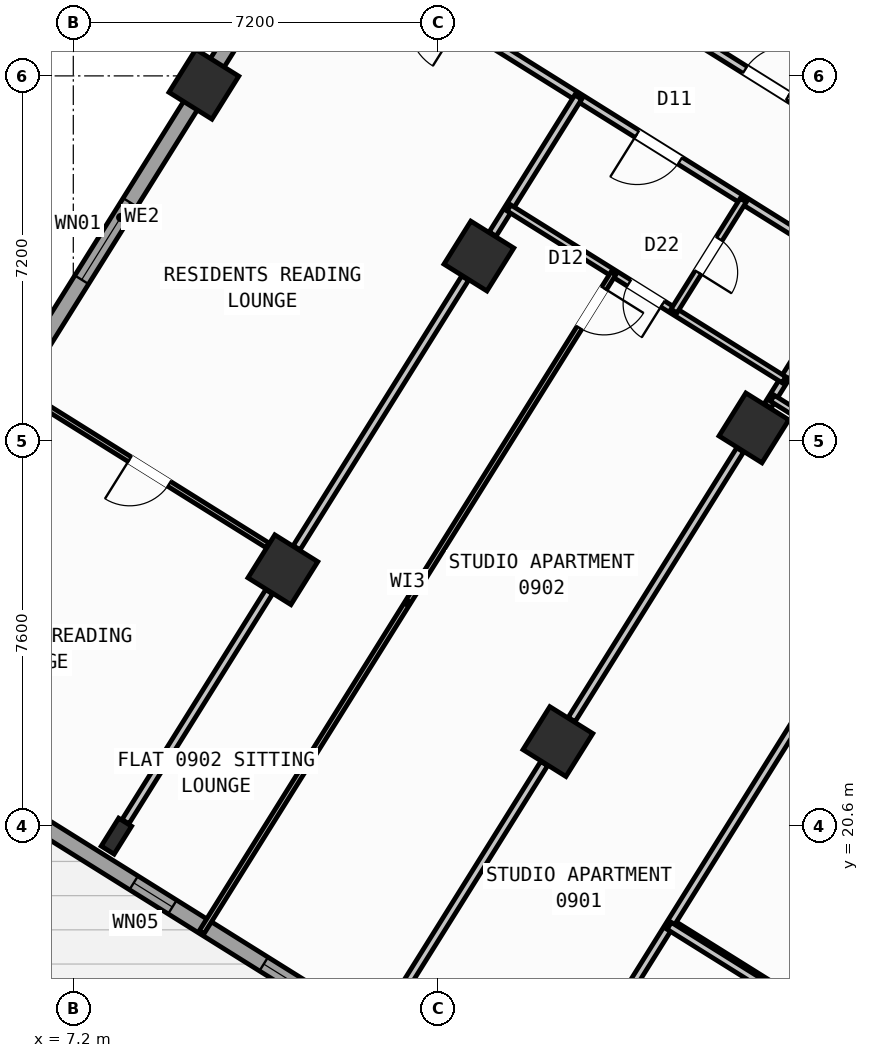
"""IFC4 building model, lengths in metres.
Left out: names, types, materials, properties, quantities, classifications, styles, units other than length and angle.
Written with IfcOpenShell. Run it as: python <this file> out.ifc"""

import sys

from ifc_helpers import new_model, si_unit, direction, frame, frame_2d, origin, origin_2d, place, context, subcontext, project, spatial, rectangle, hollow_rectangle, i_section, extrude, source, transform, mapped, element, fill, save


model = new_model("IFC4")
c1 = context("Model", 3, precision=1e-05, world=origin(), true_north=direction((0.0, 1.0)))
c2 = subcontext(c1, "Body", "Model", "MODEL_VIEW")
j1 = project(units=[si_unit("LENGTHUNIT", "METRE"), si_unit("PLANEANGLEUNIT", "RADIAN")], contexts=[c1])
p1 = place(None, origin())
s1 = spatial("IfcSite", under=j1, at=p1, CompositionType="ELEMENT")
p2 = place(p1, origin())
s2 = spatial("IfcBuilding", under=s1, at=p2, CompositionType="ELEMENT")
p3 = place(p2, frame((0.0, 0.0, 38.4)))
s3 = spatial("IfcBuildingStorey", under=s2, at=p3, CompositionType="ELEMENT", Elevation=38.4)
m1 = source(origin(), c2, "Body", "SweptSolid", [
    extrude(hollow_rectangle(XDim=1.0, YDim=1.0, WallThickness=0.04, at=origin_2d()), origin(), (0.0, 0.0, 1.0), 3.6),
])
for number, where, z_axis, x_axis in (
    (1, (20.632, 28.452, 0.0), (0.0, 0.0, 1.0), (-0.848, 0.53, 0.0)),
    (2, (16.764, 22.261, 0.0), (0.0, 0.0, 1.0), (-0.848, 0.53, 0.0)),
    (3, (15.205, 31.844, 0.0), (0.0, 0.0, 1.0), (-0.848, 0.53, 0.0)),
    (4, (11.336, 25.653, 0.0), (0.0, 0.0, 1.0), (-0.848, 0.53, 0.0)),
):
    element("IfcColumn", number, at=place(p3, frame(where, z_axis=z_axis, x_axis=x_axis)), inside=s3, PredefinedType="COLUMN", context=c2, shape_type="MappedRepresentation", body=[
        mapped(m1, transform((0.0, 0.0, 0.0), scale=1.0)),
    ])
m2 = source(origin(), c2, "Body", "SweptSolid", [
    extrude(i_section(OverallWidth=0.3, OverallDepth=0.65, WebThickness=0.016, FlangeThickness=0.031, at=origin_2d()), origin(), (0.0, 0.0, 1.0), 3.6),
])
p4 = place(p3, frame((8.051, 20.395, 0.0), z_axis=(0.0, 0.0, 1.0), x_axis=(-0.848048096156, 0.529919264233, 0.0)))
e5 = element("IfcColumn", 5, at=p4, inside=s3, PredefinedType="COLUMN", context=c2, shape_type="MappedRepresentation", body=[
    mapped(m2, transform((0.0, 0.0, 0.0), scale=1.0)),
])
p5 = place(p3, frame((9.777, 35.235, 0.0), z_axis=(0.0, 0.0, 1.0), x_axis=(-0.848048096156, 0.529919264233, 0.0)))
e6 = element("IfcColumn", 6, at=p5, inside=s3, PredefinedType="COLUMN", context=c2, shape_type="MappedRepresentation", body=[
    mapped(m1, transform((0.0, 0.0, 0.0), scale=1.0)),
])
p6 = place(p3, frame((29.268, 6.429, 0.0), z_axis=(0.0, 0.0, 1.0), x_axis=(-0.848049971435, 0.529916263149, 0.0)))
e7 = element("IfcWall", 7, at=p6, inside=s3, PredefinedType="STANDARD", context=c2, shape_type="SweptSolid", body=[
    extrude(rectangle(XDim=31.588, YDim=0.32, at=frame_2d((15.794, 0.0))), origin(), (0.0, 0.0, 1.0), 3.35),
])
p7 = place(p6, frame((16.362, 0.0, 0.0)))
e8 = element("IfcOpeningElement", 8, at=p7, cuts=e7, PredefinedType="OPENING", context=c2, shape_type="SweptSolid", body=[
    extrude(rectangle(XDim=1.2, YDim=2.15, at=frame_2d((0.6, 1.075))), frame((0.0, 0.17, 0.0), z_axis=(0.0, -1.0, 0.0), x_axis=(1.0, 0.0, 0.0)), (0.0, 0.0, 1.0), 0.34),
])
p8 = place(p6, frame((2.989, 0.0, 0.8)))
e9 = element("IfcOpeningElement", 9, at=p8, cuts=e7, PredefinedType="OPENING", context=c2, shape_type="SweptSolid", body=[
    extrude(rectangle(XDim=2.1, YDim=1.55, at=frame_2d((1.05, 0.775))), frame((0.0, 0.17, 0.0), z_axis=(0.0, -1.0, 0.0), x_axis=(1.0, 0.0, 0.0)), (0.0, 0.0, 1.0), 0.34),
])
p9 = place(p6, frame((8.359, 0.0, 0.8)))
e10 = element("IfcOpeningElement", 10, at=p9, cuts=e7, PredefinedType="OPENING", context=c2, shape_type="SweptSolid", body=[
    extrude(rectangle(XDim=2.1, YDim=1.55, at=frame_2d((1.05, 0.775))), frame((0.0, 0.17, 0.0), z_axis=(0.0, -1.0, 0.0), x_axis=(1.0, 0.0, 0.0)), (0.0, 0.0, 1.0), 0.34),
])
p10 = place(p6, frame((13.284, 0.0, 0.95)))
e11 = element("IfcOpeningElement", 11, at=p10, cuts=e7, PredefinedType="OPENING", context=c2, shape_type="SweptSolid", body=[
    extrude(rectangle(XDim=1.2, YDim=1.4, at=frame_2d((0.6, 0.7))), frame((0.0, 0.17, 0.0), z_axis=(0.0, -1.0, 0.0), x_axis=(1.0, 0.0, 0.0)), (0.0, 0.0, 1.0), 0.34),
])
p11 = place(p6, frame((20.39, 0.0, 0.95)))
e12 = element("IfcOpeningElement", 12, at=p11, cuts=e7, PredefinedType="OPENING", context=c2, shape_type="SweptSolid", body=[
    extrude(rectangle(XDim=1.2, YDim=1.4, at=frame_2d((0.6, 0.7))), frame((0.0, 0.17, 0.0), z_axis=(0.0, -1.0, 0.0), x_axis=(1.0, 0.0, 0.0)), (0.0, 0.0, 1.0), 0.34),
])
p12 = place(p6, frame((23.715, 0.0, 1.0)))
e13 = element("IfcOpeningElement", 13, at=p12, cuts=e7, PredefinedType="OPENING", context=c2, shape_type="SweptSolid", body=[
    extrude(rectangle(XDim=0.9, YDim=1.25, at=frame_2d((0.45, 0.625))), frame((0.0, 0.17, 0.0), z_axis=(0.0, -1.0, 0.0), x_axis=(1.0, 0.0, 0.0)), (0.0, 0.0, 1.0), 0.34),
])
p13 = place(p6, frame((27.481, 0.0, 0.8)))
e14 = element("IfcOpeningElement", 14, at=p13, cuts=e7, PredefinedType="OPENING", context=c2, shape_type="SweptSolid", body=[
    extrude(rectangle(XDim=2.1, YDim=1.55, at=frame_2d((1.05, 0.775))), frame((0.0, 0.17, 0.0), z_axis=(0.0, -1.0, 0.0), x_axis=(1.0, 0.0, 0.0)), (0.0, 0.0, 1.0), 0.34),
])
p14 = place(p3, frame((2.415, 23.452, 0.0), z_axis=(0.0, 0.0, 1.0), x_axis=(0.52991049553, 0.848053575387, 0.0)))
e15 = element("IfcWall", 15, at=p14, inside=s3, PredefinedType="STANDARD", context=c2, shape_type="SweptSolid", body=[
    extrude(rectangle(XDim=21.587, YDim=0.32, at=frame_2d((10.794, 0.0))), origin(), (0.0, 0.0, 1.0), 2.725),
])
p15 = place(p14, frame((2.356, 0.0, 0.8)))
e16 = element("IfcOpeningElement", 16, at=p15, cuts=e15, PredefinedType="OPENING", context=c2, shape_type="SweptSolid", body=[
    extrude(rectangle(XDim=2.1, YDim=1.55, at=frame_2d((1.05, 0.775))), frame((0.0, 0.17, 0.0), z_axis=(0.0, -1.0, 0.0), x_axis=(1.0, 0.0, 0.0)), (0.0, 0.0, 1.0), 0.34),
])
p16 = place(p14, frame((9.344, 0.0, 0.85)))
e17 = element("IfcOpeningElement", 17, at=p16, cuts=e15, PredefinedType="OPENING", context=c2, shape_type="SweptSolid", body=[
    extrude(rectangle(XDim=1.8, YDim=1.5, at=frame_2d((0.9, 0.75))), frame((0.0, 0.17, 0.0), z_axis=(0.0, -1.0, 0.0), x_axis=(1.0, 0.0, 0.0)), (0.0, 0.0, 1.0), 0.34),
])
p17 = place(p14, frame((15.154, 0.0, 0.85)))
e18 = element("IfcOpeningElement", 18, at=p17, cuts=e15, PredefinedType="OPENING", context=c2, shape_type="SweptSolid", body=[
    extrude(rectangle(XDim=1.5, YDim=1.5, at=frame_2d((0.75, 0.75))), frame((0.0, 0.17, 0.0), z_axis=(0.0, -1.0, 0.0), x_axis=(1.0, 0.0, 0.0)), (0.0, 0.0, 1.0), 0.34),
])
p18 = place(p3, frame((14.138, 41.825, 0.0), z_axis=(0.0, 0.0, 1.0), x_axis=(0.848046498049, -0.529921821731, 0.0)))
e19 = element("IfcWall", 19, at=p18, inside=s3, PredefinedType="STANDARD", context=c2, shape_type="SweptSolid", body=[
    extrude(rectangle(XDim=31.588, YDim=0.32, at=frame_2d((15.794, 0.0))), origin(), (0.0, 0.0, 1.0), 3.35),
])
p19 = place(p18, frame((3.369, 0.0, 0.0)))
e20 = element("IfcOpeningElement", 20, at=p19, cuts=e19, PredefinedType="OPENING", context=c2, shape_type="SweptSolid", body=[
    extrude(rectangle(XDim=1.05, YDim=2.15, at=frame_2d((0.525, 1.075))), frame((0.0, 0.17, 0.0), z_axis=(0.0, -1.0, 0.0), x_axis=(1.0, 0.0, 0.0)), (0.0, 0.0, 1.0), 0.34),
])
p20 = place(p18, frame((0.946, 0.0, 0.85)))
e21 = element("IfcOpeningElement", 21, at=p20, cuts=e19, PredefinedType="OPENING", context=c2, shape_type="SweptSolid", body=[
    extrude(rectangle(XDim=1.8, YDim=1.5, at=frame_2d((0.9, 0.75))), frame((0.0, 0.17, 0.0), z_axis=(0.0, -1.0, 0.0), x_axis=(1.0, 0.0, 0.0)), (0.0, 0.0, 1.0), 0.34),
])
p21 = place(p18, frame((8.46, 0.0, 0.85)))
e22 = element("IfcOpeningElement", 22, at=p21, cuts=e19, PredefinedType="OPENING", context=c2, shape_type="SweptSolid", body=[
    extrude(rectangle(XDim=1.8, YDim=1.5, at=frame_2d((0.9, 0.75))), frame((0.0, 0.17, 0.0), z_axis=(0.0, -1.0, 0.0), x_axis=(1.0, 0.0, 0.0)), (0.0, 0.0, 1.0), 0.34),
])
p22 = place(p18, frame((13.899, 0.0, 0.85)))
e23 = element("IfcOpeningElement", 23, at=p22, cuts=e19, PredefinedType="OPENING", context=c2, shape_type="SweptSolid", body=[
    extrude(rectangle(XDim=1.5, YDim=1.5, at=frame_2d((0.75, 0.75))), frame((0.0, 0.17, 0.0), z_axis=(0.0, -1.0, 0.0), x_axis=(1.0, 0.0, 0.0)), (0.0, 0.0, 1.0), 0.34),
])
p23 = place(p18, frame((22.019, 0.0, 0.95)))
e24 = element("IfcOpeningElement", 24, at=p23, cuts=e19, PredefinedType="OPENING", context=c2, shape_type="SweptSolid", body=[
    extrude(rectangle(XDim=1.2, YDim=1.4, at=frame_2d((0.6, 0.7))), frame((0.0, 0.17, 0.0), z_axis=(0.0, -1.0, 0.0), x_axis=(1.0, 0.0, 0.0)), (0.0, 0.0, 1.0), 0.34),
])
p24 = place(p18, frame((27.569, 0.0, 0.95)))
e25 = element("IfcOpeningElement", 25, at=p24, cuts=e19, PredefinedType="OPENING", context=c2, shape_type="SweptSolid", body=[
    extrude(rectangle(XDim=1.2, YDim=1.4, at=frame_2d((0.6, 0.7))), frame((0.0, 0.17, 0.0), z_axis=(0.0, -1.0, 0.0), x_axis=(1.0, 0.0, 0.0)), (0.0, 0.0, 1.0), 0.34),
])
p25 = place(p3, frame((21.206, 17.292, 0.0), z_axis=(0.0, 0.0, 1.0), x_axis=(-0.848050851465, 0.529914854792, 0.0)))
e26 = element("IfcWall", 26, at=p25, inside=s3, PredefinedType="PARTITIONING", context=c2, shape_type="SweptSolid", body=[
    extrude(rectangle(XDim=2.61, YDim=0.16, at=frame_2d((1.305, 0.0))), origin(), (0.0, 0.0, 1.0), 3.34),
])
p26 = place(p3, frame((25.807, 29.582, 0.0), z_axis=(0.0, 0.0, 1.0), x_axis=(-0.529918119251, -0.84804881162, 0.0)))
e27 = element("IfcWall", 27, at=p26, inside=s3, PredefinedType="PARTITIONING", context=c2, shape_type="SweptSolid", body=[
    extrude(rectangle(XDim=17.65, YDim=0.16, at=frame_2d((8.825, 0.0))), origin(), (0.0, 0.0, 1.0), 3.34),
])
p27 = place(p3, frame((26.973, 31.447, 0.0), z_axis=(0.0, 0.0, 1.0), x_axis=(-0.848048310262, 0.529918921593, 0.0)))
e28 = element("IfcWall", 28, at=p27, inside=s3, PredefinedType="PARTITIONING", context=c2, shape_type="SweptSolid", body=[
    extrude(rectangle(XDim=16.73, YDim=0.16, at=frame_2d((8.365, 0.0))), origin(), (0.0, 0.0, 1.0), 3.34),
])
p28 = place(p27, frame((1.588, 0.0, 0.0)))
e29 = element("IfcOpeningElement", 29, at=p28, cuts=e28, PredefinedType="OPENING", context=c2, shape_type="SweptSolid", body=[
    extrude(rectangle(XDim=1.0, YDim=2.1, at=frame_2d((0.5, 1.05))), frame((0.0, 0.09, 0.0), z_axis=(0.0, -1.0, 0.0), x_axis=(1.0, 0.0, 0.0)), (0.0, 0.0, 1.0), 0.18),
])
p29 = place(p27, frame((6.685, 0.0, 0.0)))
e30 = element("IfcOpeningElement", 30, at=p29, cuts=e28, PredefinedType="OPENING", context=c2, shape_type="SweptSolid", body=[
    extrude(rectangle(XDim=1.0, YDim=2.1, at=frame_2d((0.5, 1.05))), frame((0.0, 0.09, 0.0), z_axis=(0.0, -1.0, 0.0), x_axis=(1.0, 0.0, 0.0)), (0.0, 0.0, 1.0), 0.18),
])
p30 = place(p27, frame((12.951, 0.0, 0.0)))
e31 = element("IfcOpeningElement", 31, at=p30, cuts=e28, PredefinedType="OPENING", context=c2, shape_type="SweptSolid", body=[
    extrude(rectangle(XDim=1.0, YDim=2.1, at=frame_2d((0.5, 1.05))), frame((0.0, 0.09, 0.0), z_axis=(0.0, -1.0, 0.0), x_axis=(1.0, 0.0, 0.0)), (0.0, 0.0, 1.0), 0.18),
])
p31 = place(p3, frame((25.807, 29.582, 0.0), z_axis=(0.0, 0.0, 1.0), x_axis=(-0.848052408131, 0.529912363569, 0.0)))
e32 = element("IfcWall", 32, at=p31, inside=s3, PredefinedType="PARTITIONING", context=c2, shape_type="SweptSolid", body=[
    extrude(rectangle(XDim=16.73, YDim=0.16, at=frame_2d((8.365, 0.0))), origin(), (0.0, 0.0, 1.0), 3.34),
])
p32 = place(p31, frame((2.22, 0.0, 0.0)))
e33 = element("IfcOpeningElement", 33, at=p32, cuts=e32, PredefinedType="OPENING", context=c2, shape_type="SweptSolid", body=[
    extrude(rectangle(XDim=0.86, YDim=2.05, at=frame_2d((0.43, 1.025))), frame((0.0, 0.09, 0.0), z_axis=(0.0, -1.0, 0.0), x_axis=(1.0, 0.0, 0.0)), (0.0, 0.0, 1.0), 0.18),
])
p33 = place(p31, frame((7.82, 0.0, 0.0)))
e34 = element("IfcOpeningElement", 34, at=p33, cuts=e32, PredefinedType="OPENING", context=c2, shape_type="SweptSolid", body=[
    extrude(rectangle(XDim=1.0, YDim=2.1, at=frame_2d((0.5, 1.05))), frame((0.0, 0.09, 0.0), z_axis=(0.0, -1.0, 0.0), x_axis=(1.0, 0.0, 0.0)), (0.0, 0.0, 1.0), 0.18),
])
p34 = place(p31, frame((12.95, 0.0, 0.0)))
e35 = element("IfcOpeningElement", 35, at=p34, cuts=e32, PredefinedType="OPENING", context=c2, shape_type="SweptSolid", body=[
    extrude(rectangle(XDim=1.0, YDim=2.1, at=frame_2d((0.5, 1.05))), frame((0.0, 0.09, 0.0), z_axis=(0.0, -1.0, 0.0), x_axis=(1.0, 0.0, 0.0)), (0.0, 0.0, 1.0), 0.18),
])
p35 = place(p3, frame((22.593, 31.59, 0.0), z_axis=(0.0, 0.0, 1.0), x_axis=(-0.529930102756, -0.848041323399, 0.0)))
e36 = element("IfcWall", 36, at=p35, inside=s3, PredefinedType="PARTITIONING", context=c2, shape_type="SweptSolid", body=[
    extrude(rectangle(XDim=3.188, YDim=0.16, at=frame_2d((1.594, 0.0))), origin(), (0.0, 0.0, 1.0), 2.725),
])
p36 = place(p3, frame((20.361, 28.018, 0.0), z_axis=(0.0, 0.0, 1.0), x_axis=(-0.529915015264, -0.848050751193, 0.0)))
e37 = element("IfcWall", 37, at=p36, inside=s3, PredefinedType="PARTITIONING", context=c2, shape_type="SweptSolid", body=[
    extrude(rectangle(XDim=6.276, YDim=0.16, at=frame_2d((3.138, 0.0))), origin(), (0.0, 0.0, 1.0), 2.725),
])
p37 = place(p3, frame((16.492, 21.827, 0.0), z_axis=(0.0, 0.0, 1.0), x_axis=(-0.529904608059, -0.848057254175, 0.0)))
e38 = element("IfcWall", 38, at=p37, inside=s3, PredefinedType="PARTITIONING", context=c2, shape_type="SweptSolid", body=[
    extrude(rectangle(XDim=5.351, YDim=0.16, at=frame_2d((2.675, 0.0))), origin(), (0.0, 0.0, 1.0), 2.725),
])
p38 = place(p3, frame((24.212, 27.029, 0.0), z_axis=(0.0, 0.0, 1.0), x_axis=(-0.84803087207, 0.529946827537, 0.0)))
e39 = element("IfcWall", 39, at=p38, inside=s3, PredefinedType="PLUMBINGWALL", context=c2, shape_type="SweptSolid", body=[
    extrude(rectangle(XDim=3.79, YDim=0.14, at=frame_2d((1.895, 0.0))), origin(), (0.0, 0.0, 1.0), 3.34),
])
p39 = place(p38, frame((2.23, 0.0, 0.0)))
e40 = element("IfcOpeningElement", 40, at=p39, cuts=e39, PredefinedType="OPENING", context=c2, shape_type="SweptSolid", body=[
    extrude(rectangle(XDim=0.92, YDim=2.08, at=frame_2d((0.46, 1.04))), frame((0.0, 0.08, 0.0), z_axis=(0.0, -1.0, 0.0), x_axis=(1.0, 0.0, 0.0)), (0.0, 0.0, 1.0), 0.16),
])
p40 = place(p3, frame((17.165, 34.981, 0.0), z_axis=(0.0, 0.0, 1.0), x_axis=(-0.529930102756, -0.848041323399, 0.0)))
e41 = element("IfcWall", 41, at=p40, inside=s3, PredefinedType="PARTITIONING", context=c2, shape_type="SweptSolid", body=[
    extrude(rectangle(XDim=3.188, YDim=0.16, at=frame_2d((1.594, 0.0))), origin(), (0.0, 0.0, 1.0), 2.725),
])
p41 = place(p3, frame((14.933, 31.409, 0.0), z_axis=(0.0, 0.0, 1.0), x_axis=(-0.529897533635, -0.848061674554, 0.0)))
e42 = element("IfcWall", 42, at=p41, inside=s3, PredefinedType="PARTITIONING", context=c2, shape_type="SweptSolid", body=[
    extrude(rectangle(XDim=6.276, YDim=0.16, at=frame_2d((3.138, 0.0))), origin(), (0.0, 0.0, 1.0), 2.725),
])
p42 = place(p3, frame((11.065, 25.219, 0.0), z_axis=(0.0, 0.0, 1.0), x_axis=(-0.529904608059, -0.848057254175, 0.0)))
e43 = element("IfcWall", 43, at=p42, inside=s3, PredefinedType="PARTITIONING", context=c2, shape_type="SweptSolid", body=[
    extrude(rectangle(XDim=5.351, YDim=0.16, at=frame_2d((2.675, 0.0))), origin(), (0.0, 0.0, 1.0), 2.725),
])
p43 = place(p3, frame((21.226, 29.402, 0.0), z_axis=(0.0, 0.0, 1.0), x_axis=(-0.848039019877, 0.529933789039, 0.0)))
e44 = element("IfcWall", 44, at=p43, inside=s3, PredefinedType="PLUMBINGWALL", context=c2, shape_type="SweptSolid", body=[
    extrude(rectangle(XDim=6.4, YDim=0.14, at=frame_2d((3.2, 0.0))), origin(), (0.0, 0.0, 1.0), 3.34),
])
p44 = place(p43, frame((2.824, 0.0, 0.0)))
e45 = element("IfcOpeningElement", 45, at=p44, cuts=e44, PredefinedType="OPENING", context=c2, shape_type="SweptSolid", body=[
    extrude(rectangle(XDim=0.78, YDim=2.05, at=frame_2d((0.39, 1.025))), frame((0.0, 0.08, 0.0), z_axis=(0.0, -1.0, 0.0), x_axis=(1.0, 0.0, 0.0)), (0.0, 0.0, 1.0), 0.16),
])
p45 = place(p3, frame((20.422, 32.947, 0.0), z_axis=(0.0, 0.0, 1.0), x_axis=(-0.529913878929, -0.848051461244, 0.0)))
e46 = element("IfcWall", 46, at=p45, inside=s3, PredefinedType="PLUMBINGWALL", context=c2, shape_type="SweptSolid", body=[
    extrude(rectangle(XDim=2.58, YDim=0.14, at=frame_2d((1.29, 0.0))), origin(), (0.0, 0.0, 1.0), 3.34),
])
p46 = place(p45, frame((0.9, 0.0, 0.0)))
e47 = element("IfcOpeningElement", 47, at=p46, cuts=e46, PredefinedType="OPENING", context=c2, shape_type="SweptSolid", body=[
    extrude(rectangle(XDim=0.78, YDim=2.05, at=frame_2d((0.39, 1.025))), frame((0.0, 0.08, 0.0), z_axis=(0.0, -1.0, 0.0), x_axis=(1.0, 0.0, 0.0)), (0.0, 0.0, 1.0), 0.16),
])
p47 = place(p3, frame((17.861, 31.505, 0.0), z_axis=(0.0, 0.0, 1.0), x_axis=(-0.529928839727, -0.848042112649, 0.0)))
e48 = element("IfcWall", 48, at=p47, inside=s3, PredefinedType="PARTITIONING", context=c2, shape_type="SweptSolid", body=[
    extrude(rectangle(XDim=15.34, YDim=0.11, at=frame_2d((7.67, 0.0))), origin(), (0.0, 0.0, 1.0), 3.34),
])
p48 = place(p47, frame((0.35, 0.0, 0.0)))
e49 = element("IfcOpeningElement", 49, at=p48, cuts=e48, PredefinedType="OPENING", context=c2, shape_type="SweptSolid", body=[
    extrude(rectangle(XDim=0.92, YDim=2.08, at=frame_2d((0.46, 1.04))), frame((0.0, 0.065, 0.0), z_axis=(0.0, -1.0, 0.0), x_axis=(1.0, 0.0, 0.0)), (0.0, 0.0, 1.0), 0.13),
])
p49 = place(p3, frame((11.033, 26.135, 0.0), z_axis=(0.0, 0.0, 1.0), x_axis=(-0.848044224181, 0.529925460639, 0.0)))
e50 = element("IfcWall", 50, at=p49, inside=s3, PredefinedType="PARTITIONING", context=c2, shape_type="SweptSolid", body=[
    extrude(rectangle(XDim=5.376, YDim=0.11, at=frame_2d((2.688, 0.0))), origin(), (0.0, 0.0, 1.0), 2.725),
])
p50 = place(p49, frame((2.288, 0.0, 0.0)))
e51 = element("IfcOpeningElement", 51, at=p50, cuts=e50, PredefinedType="OPENING", context=c2, shape_type="SweptSolid", body=[
    extrude(rectangle(XDim=0.92, YDim=2.08, at=frame_2d((0.46, 1.04))), frame((0.0, 0.065, 0.0), z_axis=(0.0, -1.0, 0.0), x_axis=(1.0, 0.0, 0.0)), (0.0, 0.0, 1.0), 0.13),
])
p51 = place(p3, frame((32.164, 10.374, 0.0), z_axis=(0.0, 0.0, 1.0), x_axis=(-0.848044107957, 0.529925646633, 0.0)))
e52 = element("IfcWall", 52, at=p51, inside=s3, PredefinedType="PARTITIONING", context=c2, shape_type="SweptSolid", body=[
    extrude(rectangle(XDim=15.57, YDim=0.16, at=frame_2d((7.785, 0.0))), origin(), (0.0, 0.0, 1.0), 3.34),
])
p52 = place(p51, frame((10.83, 0.0, 0.0)))
e53 = element("IfcOpeningElement", 53, at=p52, cuts=e52, PredefinedType="OPENING", context=c2, shape_type="SweptSolid", body=[
    extrude(rectangle(XDim=1.0, YDim=2.1, at=frame_2d((0.5, 1.05))), frame((0.0, 0.09, 0.0), z_axis=(0.0, -1.0, 0.0), x_axis=(1.0, 0.0, 0.0)), (0.0, 0.0, 1.0), 0.18),
])
m3 = source(origin(), c2, "Body", "SweptSolid", [
    extrude(rectangle(XDim=1.2, YDim=1.4, at=frame_2d((0.6, 0.7))), frame((0.0, 0.03, 0.0), z_axis=(0.0, -1.0, 0.0), x_axis=(1.0, 0.0, 0.0)), (0.0, 0.0, 1.0), 0.06),
])
p53 = place(p11, origin())
e54 = element("IfcWindow", 54, at=p53, inside=s3, PartitioningType="SINGLE_PANEL", PredefinedType="WINDOW", context=c2, shape_type="MappedRepresentation", body=[
    mapped(m3, transform((0.0, 0.0, 0.0), scale=1.0)),
])
fill(e12, e54)
m4 = source(origin(), c2, "Body", "SweptSolid", [
    extrude(rectangle(XDim=0.9, YDim=1.25, at=frame_2d((0.45, 0.625))), frame((0.0, 0.03, 0.0), z_axis=(0.0, -1.0, 0.0), x_axis=(1.0, 0.0, 0.0)), (0.0, 0.0, 1.0), 0.06),
])
p54 = place(p12, origin())
e55 = element("IfcWindow", 55, at=p54, inside=s3, PartitioningType="SINGLE_PANEL", PredefinedType="WINDOW", context=c2, shape_type="MappedRepresentation", body=[
    mapped(m4, transform((0.0, 0.0, 0.0), scale=1.0)),
])
fill(e13, e55)
m5 = source(origin(), c2, "Body", "SweptSolid", [
    extrude(rectangle(XDim=1.8, YDim=1.5, at=frame_2d((0.9, 0.75))), frame((0.0, 0.03, 0.0), z_axis=(0.0, -1.0, 0.0), x_axis=(1.0, 0.0, 0.0)), (0.0, 0.0, 1.0), 0.06),
])
p55 = place(p16, origin())
e56 = element("IfcWindow", 56, at=p55, inside=s3, PartitioningType="SINGLE_PANEL", PredefinedType="WINDOW", context=c2, shape_type="MappedRepresentation", body=[
    mapped(m5, transform((0.0, 0.0, 0.0), scale=1.0)),
])
fill(e17, e56)
m6 = source(origin(), c2, "Body", "SweptSolid", [
    extrude(rectangle(XDim=0.92, YDim=2.08, at=frame_2d((0.46, 1.04))), frame((0.0, 0.025, 0.0), z_axis=(0.0, -1.0, 0.0), x_axis=(1.0, 0.0, 0.0)), (0.0, 0.0, 1.0), 0.05),
])
p56 = place(p48, origin())
e57 = element("IfcDoor", 57, at=p56, inside=s3, OperationType="SINGLE_SWING_LEFT", PredefinedType="DOOR", context=c2, shape_type="MappedRepresentation", body=[
    mapped(m6, transform((0.0, 0.0, 0.0), scale=1.0)),
])
fill(e49, e57)
m7 = source(origin(), c2, "Body", "SweptSolid", [
    extrude(rectangle(XDim=1.0, YDim=2.1, at=frame_2d((0.5, 1.05))), frame((0.0, 0.025, 0.0), z_axis=(0.0, -1.0, 0.0), x_axis=(1.0, 0.0, 0.0)), (0.0, 0.0, 1.0), 0.05),
])
p57 = place(p33, origin())
e58 = element("IfcDoor", 58, at=p57, inside=s3, OperationType="SINGLE_SWING_RIGHT", PredefinedType="DOOR", context=c2, shape_type="MappedRepresentation", body=[
    mapped(m7, transform((0.0, 0.0, 0.0), scale=1.0)),
])
fill(e34, e58)
m8 = source(origin(), c2, "Body", "SweptSolid", [
    extrude(rectangle(XDim=0.78, YDim=2.05, at=frame_2d((0.39, 1.025))), frame((0.0, 0.025, 0.0), z_axis=(0.0, -1.0, 0.0), x_axis=(1.0, 0.0, 0.0)), (0.0, 0.0, 1.0), 0.05),
])
p58 = place(p44, origin())
e59 = element("IfcDoor", 59, at=p58, inside=s3, OperationType="SINGLE_SWING_LEFT", PredefinedType="DOOR", context=c2, shape_type="MappedRepresentation", body=[
    mapped(m8, transform((0.0, 0.0, 0.0), scale=1.0)),
])
fill(e45, e59)
p59 = place(p46, origin())
e60 = element("IfcDoor", 60, at=p59, inside=s3, OperationType="SINGLE_SWING_RIGHT", PredefinedType="DOOR", context=c2, shape_type="MappedRepresentation", body=[
    mapped(m8, transform((0.0, 0.0, 0.0), scale=1.0)),
])
fill(e47, e60)
p60 = place(p50, origin())
e61 = element("IfcDoor", 61, at=p60, inside=s3, OperationType="SINGLE_SWING_RIGHT", PredefinedType="DOOR", context=c2, shape_type="MappedRepresentation", body=[
    mapped(m6, transform((0.0, 0.0, 0.0), scale=1.0)),
])
fill(e51, e61)
p61 = place(p29, frame((1.0, 0.0, 0.0), z_axis=(0.0, 0.0, 1.0), x_axis=(-1.0, 0.0, 0.0)))
e62 = element("IfcDoor", 62, at=p61, inside=s3, OperationType="SINGLE_SWING_RIGHT", PredefinedType="DOOR", context=c2, shape_type="MappedRepresentation", body=[
    mapped(m7, transform((0.0, 0.0, 0.0), scale=1.0)),
])
fill(e30, e62)
save(model, sys.argv[1])
